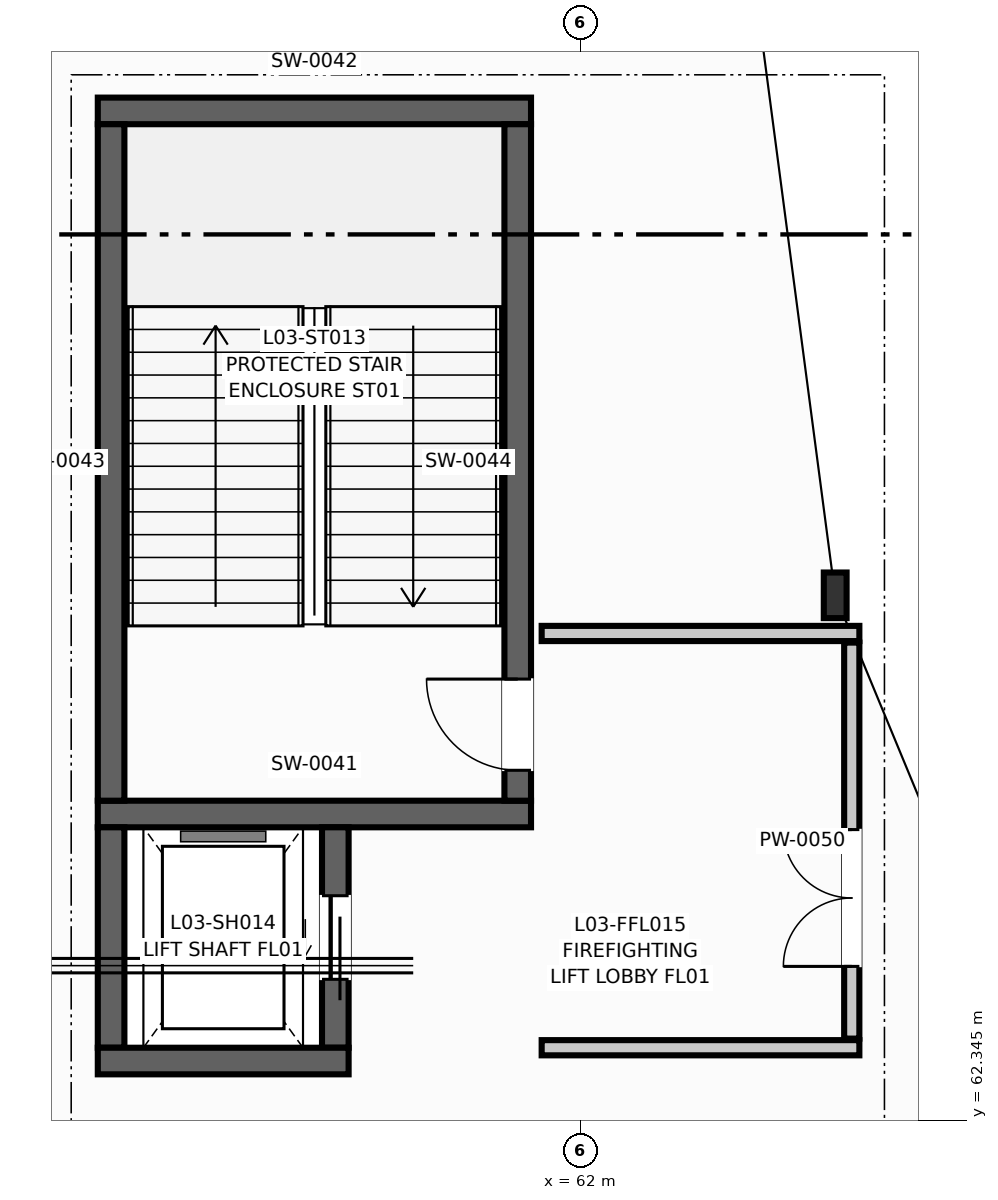
"""IFC4 building model, lengths in metres.
Left out: names, types, materials, properties, quantities, classifications, styles, units other than length and angle.
Written with IfcOpenShell. Run it as: python <this file> out.ifc"""

import sys

from ifc_helpers import new_model, si_unit, direction, frame, frame_2d, origin, origin_2d, place, context, subcontext, project, spatial, rectangle, i_section, extrude, element, fill, save


model = new_model("IFC4")
c1 = context("Model", 3, precision=1e-05, world=origin(), true_north=direction((0.0, 1.0)))
c2 = subcontext(c1, "Body", "Model", "MODEL_VIEW")
j1 = project(units=[si_unit("LENGTHUNIT", "METRE"), si_unit("PLANEANGLEUNIT", "RADIAN")], contexts=[c1])
p1 = place(None, origin())
s1 = spatial("IfcSite", under=j1, at=p1, CompositionType="ELEMENT")
p2 = place(p1, origin())
s2 = spatial("IfcBuilding", under=s1, at=p2, CompositionType="ELEMENT")
p3 = place(p2, frame((0.0, 0.0, 13.5)))
s3 = spatial("IfcBuildingStorey", under=s2, at=p3, CompositionType="ELEMENT", Elevation=13.5)
p4 = place(p3, frame((65.352, 69.252, 0.0), z_axis=(0.0, 0.0, 1.0), x_axis=(1.0, 0.0, 0.0)))
e1 = element("IfcColumn", 1, at=p4, inside=s3, PredefinedType="COLUMN", context=c2, shape_type="SweptSolid", body=[
    extrude(i_section(OverallWidth=0.3, OverallDepth=0.6, WebThickness=0.015, FlangeThickness=0.03, at=origin_2d()), origin(), (0.0, 0.0, 1.0), 4.5),
])
p5 = place(p3, frame((50.766, 65.344, 0.0), z_axis=(0.0, 0.0, 1.0), x_axis=(0.382653578879, -0.923891897665, 0.0)))
e2 = element("IfcWall", 2, at=p5, inside=s3, PredefinedType="SOLIDWALL", context=c2, shape_type="SweptSolid", body=[
    extrude(rectangle(XDim=12.766, YDim=0.28, at=frame_2d((6.383, 0.0))), origin(), (0.0, 0.0, 1.0), 3.1),
])
p6 = place(p5, frame((5.483, 0.0, 0.0)))
e3 = element("IfcOpeningElement", 3, at=p6, cuts=e2, PredefinedType="OPENING", context=c2, shape_type="SweptSolid", body=[
    extrude(rectangle(XDim=1.8, YDim=2.35, at=frame_2d((0.9, 1.175))), frame((0.0, 0.15, 0.0), z_axis=(0.0, -1.0, 0.0), x_axis=(1.0, 0.0, 0.0)), (0.0, 0.0, 1.0), 0.3),
])
for number, where, z_axis, x_axis in (
    (4, (55.65, 66.375, 0.0), (0.0, 0.0, 1.0), (1.0, 0.0, 0.0)),
    (5, (55.65, 75.625, 0.0), (0.0, 0.0, 1.0), (1.0, 0.0, 0.0)),
):
    element("IfcWall", number, at=place(p3, frame(where, z_axis=z_axis, x_axis=x_axis)), inside=s3, PredefinedType="SHEAR", context=c2, shape_type="SweptSolid", body=[
        extrude(rectangle(XDim=5.7, YDim=0.35, at=frame_2d((2.85, 0.0))), origin(), (0.0, 0.0, 1.0), 4.25),
    ])
p7 = place(p3, frame((55.825, 66.55, 0.0), z_axis=(0.0, 0.0, 1.0), x_axis=(0.0, 1.0, 0.0)))
e6 = element("IfcWall", 6, at=p7, inside=s3, PredefinedType="SHEAR", context=c2, shape_type="SweptSolid", body=[
    extrude(rectangle(XDim=8.9, YDim=0.35, at=frame_2d((4.45, 0.0))), origin(), (0.0, 0.0, 1.0), 4.25),
])
p8 = place(p3, frame((61.175, 66.55, 0.0), z_axis=(0.0, 0.0, 1.0), x_axis=(0.0, 1.0, 0.0)))
e7 = element("IfcWall", 7, at=p8, inside=s3, PredefinedType="SHEAR", context=c2, shape_type="SweptSolid", body=[
    extrude(rectangle(XDim=8.9, YDim=0.35, at=frame_2d((4.45, 0.0))), origin(), (0.0, 0.0, 1.0), 4.25),
])
p9 = place(p8, frame((0.4, 0.0, 0.0)))
e8 = element("IfcOpeningElement", 8, at=p9, cuts=e7, PredefinedType="OPENING", context=c2, shape_type="SweptSolid", body=[
    extrude(rectangle(XDim=1.2, YDim=2.2, at=frame_2d((0.6, 1.1))), frame((0.0, 0.185, 0.0), z_axis=(0.0, -1.0, 0.0), x_axis=(1.0, 0.0, 0.0)), (0.0, 0.0, 1.0), 0.37),
])
p10 = place(p3, frame((55.825, 63.3, 0.0), z_axis=(0.0, 0.0, 1.0), x_axis=(0.0, 1.0, 0.0)))
e9 = element("IfcWall", 9, at=p10, inside=s3, PredefinedType="SHEAR", context=c2, shape_type="SweptSolid", body=[
    extrude(rectangle(XDim=2.9, YDim=0.35, at=frame_2d((1.45, 0.0))), origin(), (0.0, 0.0, 1.0), 4.25),
])
p11 = place(p3, frame((58.775, 63.3, 0.0), z_axis=(0.0, 0.0, 1.0), x_axis=(0.0, 1.0, 0.0)))
e10 = element("IfcWall", 10, at=p11, inside=s3, PredefinedType="SHEAR", context=c2, shape_type="SweptSolid", body=[
    extrude(rectangle(XDim=2.9, YDim=0.35, at=frame_2d((1.45, 0.0))), origin(), (0.0, 0.0, 1.0), 4.25),
])
p12 = place(p11, frame((0.9, 0.0, 0.0)))
e11 = element("IfcOpeningElement", 11, at=p12, cuts=e10, PredefinedType="OPENING", context=c2, shape_type="SweptSolid", body=[
    extrude(rectangle(XDim=1.1, YDim=2.2, at=frame_2d((0.55, 1.1))), frame((0.0, 0.185, 0.0), z_axis=(0.0, -1.0, 0.0), x_axis=(1.0, 0.0, 0.0)), (0.0, 0.0, 1.0), 0.37),
])
p13 = place(p3, frame((55.65, 63.125, 0.0), z_axis=(0.0, 0.0, 1.0), x_axis=(1.0, 0.0, 0.0)))
e12 = element("IfcWall", 12, at=p13, inside=s3, PredefinedType="SHEAR", context=c2, shape_type="SweptSolid", body=[
    extrude(rectangle(XDim=3.3, YDim=0.35, at=frame_2d((1.65, 0.0))), origin(), (0.0, 0.0, 1.0), 4.25),
])
for number, where, z_axis, x_axis in (
    (13, (61.49, 63.3, 0.0), (0.0, 0.0, 1.0), (1.0, 0.0, 0.0)),
    (14, (61.49, 68.75, 0.0), (0.0, 0.0, 1.0), (1.0, 0.0, 0.0)),
):
    element("IfcWall", number, at=place(p3, frame(where, z_axis=z_axis, x_axis=x_axis)), inside=s3, PredefinedType="PARTITIONING", context=c2, shape_type="SweptSolid", body=[
        extrude(rectangle(XDim=4.18, YDim=0.2, at=frame_2d((2.09, 0.0))), origin(), (0.0, 0.0, 1.0), 3.22),
    ])
p14 = place(p3, frame((65.57, 63.42, 0.0), z_axis=(0.0, 0.0, 1.0), x_axis=(0.0, 1.0, 0.0)))
e15 = element("IfcWall", 15, at=p14, inside=s3, PredefinedType="PARTITIONING", context=c2, shape_type="SweptSolid", body=[
    extrude(rectangle(XDim=5.21, YDim=0.2, at=frame_2d((2.605, 0.0))), origin(), (0.0, 0.0, 1.0), 3.22),
])
p15 = place(p14, frame((0.95, 0.0, 0.0)))
e16 = element("IfcOpeningElement", 16, at=p15, cuts=e15, PredefinedType="OPENING", context=c2, shape_type="SweptSolid", body=[
    extrude(rectangle(XDim=1.8, YDim=2.2, at=frame_2d((0.9, 1.1))), frame((0.0, 0.11, 0.0), z_axis=(0.0, -1.0, 0.0), x_axis=(1.0, 0.0, 0.0)), (0.0, 0.0, 1.0), 0.22),
])
p16 = place(p9, origin())
e17 = element("IfcDoor", 17, at=p16, inside=s3, OperationType="SINGLE_SWING_RIGHT", PredefinedType="DOOR", context=c2, shape_type="SweptSolid", body=[
    extrude(rectangle(XDim=1.2, YDim=2.2, at=frame_2d((0.6, 1.1))), frame((0.0, 0.025, 0.0), z_axis=(0.0, -1.0, 0.0), x_axis=(1.0, 0.0, 0.0)), (0.0, 0.0, 1.0), 0.05),
])
fill(e8, e17)
p17 = place(p12, origin())
e18 = element("IfcDoor", 18, at=p17, inside=s3, OperationType="SLIDING_TO_LEFT", PredefinedType="DOOR", context=c2, shape_type="SweptSolid", body=[
    extrude(rectangle(XDim=1.1, YDim=2.2, at=frame_2d((0.55, 1.1))), frame((0.0, 0.025, 0.0), z_axis=(0.0, -1.0, 0.0), x_axis=(1.0, 0.0, 0.0)), (0.0, 0.0, 1.0), 0.05),
])
fill(e11, e18)
p18 = place(p15, origin())
e19 = element("IfcDoor", 19, at=p18, inside=s3, OperationType="DOUBLE_DOOR_SINGLE_SWING", PredefinedType="DOOR", context=c2, shape_type="SweptSolid", body=[
    extrude(rectangle(XDim=1.8, YDim=2.2, at=frame_2d((0.9, 1.1))), frame((0.0, 0.025, 0.0), z_axis=(0.0, -1.0, 0.0), x_axis=(1.0, 0.0, 0.0)), (0.0, 0.0, 1.0), 0.05),
])
fill(e16, e19)
save(model, sys.argv[1])
